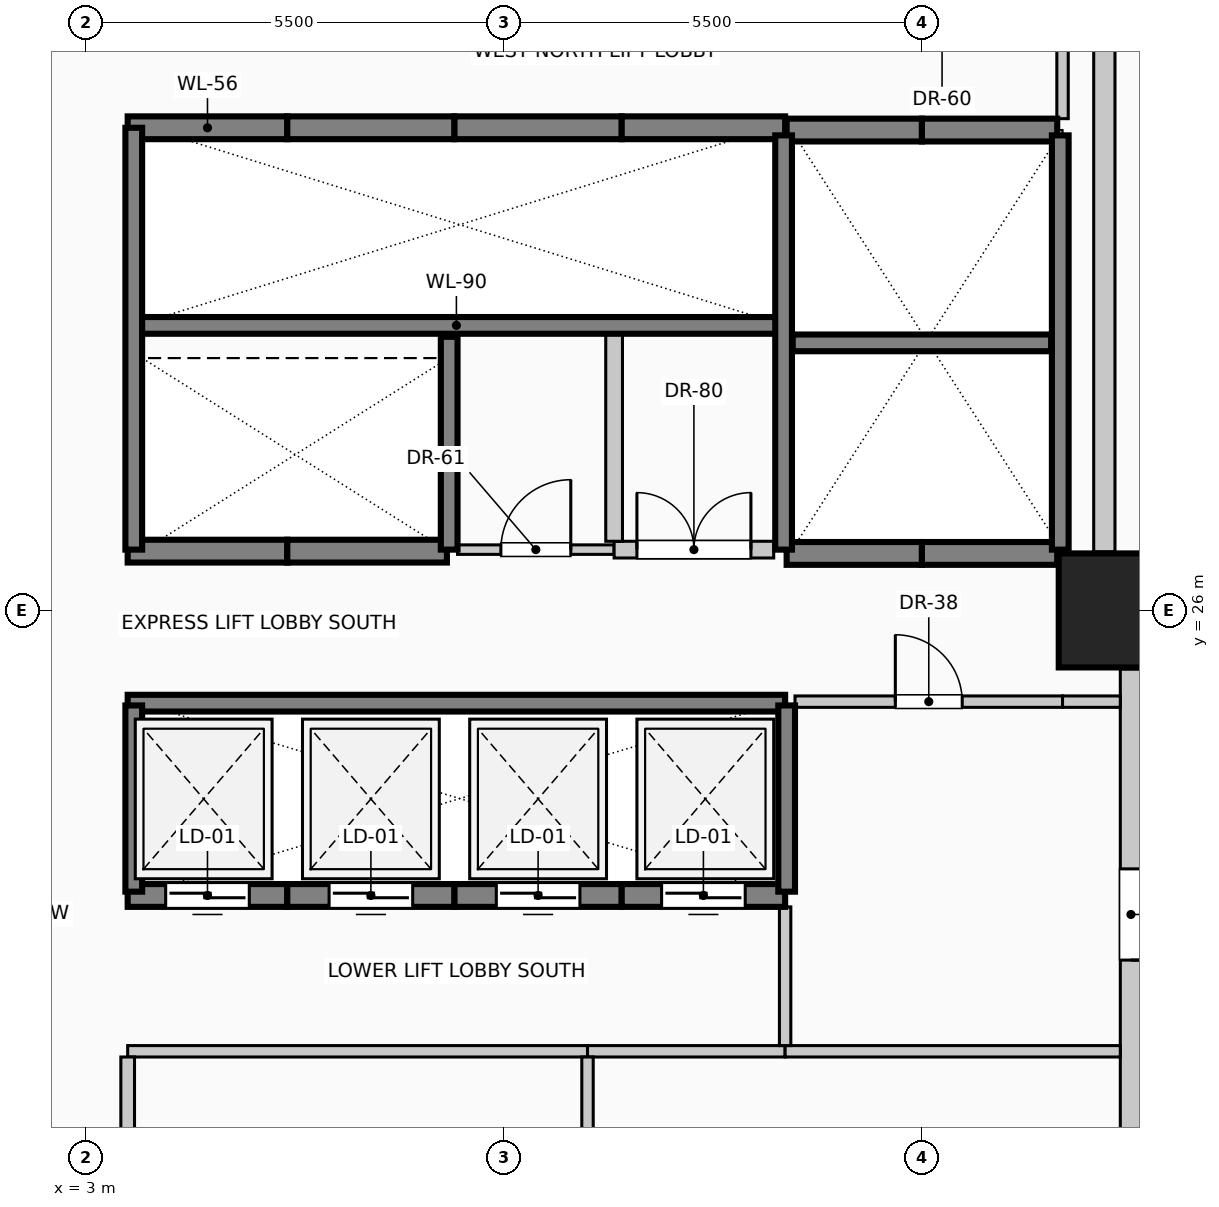
"""IFC4 building model, lengths in metres.
Left out: names, types, materials, properties, quantities, classifications, styles, units other than length and angle.
Written with IfcOpenShell. Run it as: python <this file> out.ifc"""

import sys

from ifc_helpers import new_model, si_unit, direction, frame, frame_2d, origin, origin_2d, place, context, subcontext, project, spatial, rectangle, extrude, element, fill, save


model = new_model("IFC4")
c1 = context("Model", 3, precision=1e-05, world=origin(), true_north=direction((0.0, 1.0)))
c2 = subcontext(c1, "Body", "Model", "MODEL_VIEW")
j1 = project(units=[si_unit("LENGTHUNIT", "METRE"), si_unit("PLANEANGLEUNIT", "RADIAN")], contexts=[c1])
p1 = place(None, origin())
s1 = spatial("IfcSite", under=j1, at=p1, CompositionType="ELEMENT")
p2 = place(p1, origin())
s2 = spatial("IfcBuilding", under=s1, at=p2, CompositionType="ELEMENT")
p3 = place(p2, frame((0.0, 0.0, 38.6)))
s3 = spatial("IfcBuildingStorey", under=s2, at=p3, CompositionType="ELEMENT", Elevation=38.6)
p4 = place(p3, frame((16.4, 26.0, 0.0), z_axis=(0.0, 0.0, 1.0), x_axis=(1.0, 0.0, 0.0)))
e1 = element("IfcColumn", 1, at=p4, inside=s3, PredefinedType="COLUMN", context=c2, shape_type="SweptSolid", body=[
    extrude(rectangle(XDim=1.2, YDim=1.5, at=origin_2d()), origin(), (0.0, 0.0, 1.0), 4.0),
])
p5 = place(p3, frame((16.75, 25.23, 0.0), z_axis=(0.0, 0.0, 1.0), x_axis=(0.0, -1.0, 0.0)))
e2 = element("IfcWall", 2, at=p5, inside=s3, PredefinedType="SOLIDWALL", context=c2, shape_type="SweptSolid", body=[
    extrude(rectangle(XDim=6.46, YDim=0.28, at=frame_2d((3.23, 0.0))), origin(), (0.0, 0.0, 1.0), 3.7),
])
p6 = place(p5, frame((2.63, 0.0, 0.0)))
e3 = element("IfcOpeningElement", 3, at=p6, cuts=e2, PredefinedType="OPENING", context=c2, shape_type="SweptSolid", body=[
    extrude(rectangle(XDim=1.2, YDim=2.25, at=frame_2d((0.6, 1.125))), frame((0.0, 0.15, 0.0), z_axis=(0.0, -1.0, 0.0), x_axis=(1.0, 0.0, 0.0)), (0.0, 0.0, 1.0), 0.3),
])
p7 = place(p3, frame((16.4, 33.48, 0.0), z_axis=(0.0, 0.0, 1.0), x_axis=(0.0, -1.0, 0.0)))
e4 = element("IfcWall", 4, at=p7, inside=s3, PredefinedType="SOLIDWALL", context=c2, shape_type="SweptSolid", body=[
    extrude(rectangle(XDim=6.71, YDim=0.28, at=frame_2d((3.355, 0.0))), origin(), (0.0, 0.0, 1.0), 3.0),
])
p8 = place(p3, frame((5.65, 22.25, 0.0), z_axis=(0.0, 0.0, 1.0), x_axis=(-1.0, 0.0, 0.0)))
e5 = element("IfcWall", 5, at=p8, inside=s3, PredefinedType="SOLIDWALL", context=c2, shape_type="SweptSolid", body=[
    extrude(rectangle(XDim=2.1, YDim=0.3, at=frame_2d((1.05, 0.0))), origin(), (0.0, 0.0, 1.0), 4.0),
])
p9 = place(p8, frame((0.5, 0.0, 0.0)))
e6 = element("IfcOpeningElement", 6, at=p9, cuts=e5, PredefinedType="OPENING", context=c2, shape_type="SweptSolid", body=[
    extrude(rectangle(XDim=1.1, YDim=2.2, at=frame_2d((0.55, 1.1))), frame((0.0, 0.16, 0.0), z_axis=(0.0, -1.0, 0.0), x_axis=(1.0, 0.0, 0.0)), (0.0, 0.0, 1.0), 0.32),
])
p10 = place(p3, frame((7.85, 22.25, 0.0), z_axis=(0.0, 0.0, 1.0), x_axis=(-1.0, 0.0, 0.0)))
e7 = element("IfcWall", 7, at=p10, inside=s3, PredefinedType="SOLIDWALL", context=c2, shape_type="SweptSolid", body=[
    extrude(rectangle(XDim=2.2, YDim=0.3, at=frame_2d((1.1, 0.0))), origin(), (0.0, 0.0, 1.0), 4.0),
])
p11 = place(p10, frame((0.55, 0.0, 0.0)))
e8 = element("IfcOpeningElement", 8, at=p11, cuts=e7, PredefinedType="OPENING", context=c2, shape_type="SweptSolid", body=[
    extrude(rectangle(XDim=1.1, YDim=2.2, at=frame_2d((0.55, 1.1))), frame((0.0, 0.16, 0.0), z_axis=(0.0, -1.0, 0.0), x_axis=(1.0, 0.0, 0.0)), (0.0, 0.0, 1.0), 0.32),
])
p12 = place(p3, frame((10.05, 22.25, 0.0), z_axis=(0.0, 0.0, 1.0), x_axis=(-1.0, 0.0, 0.0)))
e9 = element("IfcWall", 9, at=p12, inside=s3, PredefinedType="SOLIDWALL", context=c2, shape_type="SweptSolid", body=[
    extrude(rectangle(XDim=2.2, YDim=0.3, at=frame_2d((1.1, 0.0))), origin(), (0.0, 0.0, 1.0), 4.0),
])
p13 = place(p12, frame((0.55, 0.0, 0.0)))
e10 = element("IfcOpeningElement", 10, at=p13, cuts=e9, PredefinedType="OPENING", context=c2, shape_type="SweptSolid", body=[
    extrude(rectangle(XDim=1.1, YDim=2.2, at=frame_2d((0.55, 1.1))), frame((0.0, 0.16, 0.0), z_axis=(0.0, -1.0, 0.0), x_axis=(1.0, 0.0, 0.0)), (0.0, 0.0, 1.0), 0.32),
])
p14 = place(p3, frame((12.2, 22.25, 0.0), z_axis=(0.0, 0.0, 1.0), x_axis=(-1.0, 0.0, 0.0)))
e11 = element("IfcWall", 11, at=p14, inside=s3, PredefinedType="SOLIDWALL", context=c2, shape_type="SweptSolid", body=[
    extrude(rectangle(XDim=2.15, YDim=0.3, at=frame_2d((1.075, 0.0))), origin(), (0.0, 0.0, 1.0), 4.0),
])
p15 = place(p14, frame((0.525, 0.0, 0.0)))
e12 = element("IfcOpeningElement", 12, at=p15, cuts=e11, PredefinedType="OPENING", context=c2, shape_type="SweptSolid", body=[
    extrude(rectangle(XDim=1.1, YDim=2.2, at=frame_2d((0.55, 1.1))), frame((0.0, 0.16, 0.0), z_axis=(0.0, -1.0, 0.0), x_axis=(1.0, 0.0, 0.0)), (0.0, 0.0, 1.0), 0.32),
])
for number, where, z_axis, x_axis in (
    (13, (14.0, 26.75, 0.0), (0.0, 0.0, 1.0), (-1.0, 0.0, 0.0)),
    (14, (15.78, 26.75, 0.0), (0.0, 0.0, 1.0), (-1.0, 0.0, 0.0)),
    (15, (12.22, 32.32, 0.0), (0.0, 0.0, 1.0), (1.0, 0.0, 0.0)),
    (16, (14.0, 32.32, 0.0), (0.0, 0.0, 1.0), (1.0, 0.0, 0.0)),
):
    element("IfcWall", number, at=place(p3, frame(where, z_axis=z_axis, x_axis=x_axis)), inside=s3, PredefinedType="SOLIDWALL", context=c2, shape_type="SweptSolid", body=[
        extrude(rectangle(XDim=1.78, YDim=0.3, at=frame_2d((0.89, 0.0))), origin(), (0.0, 0.0, 1.0), 4.0),
    ])
p16 = place(p3, frame((3.55, 32.35, 0.0), z_axis=(0.0, 0.0, 1.0), x_axis=(1.0, 0.0, 0.0)))
e17 = element("IfcWall", 17, at=p16, inside=s3, PredefinedType="SOLIDWALL", context=c2, shape_type="SweptSolid", body=[
    extrude(rectangle(XDim=2.1, YDim=0.3, at=frame_2d((1.05, 0.0))), origin(), (0.0, 0.0, 1.0), 4.0),
])
p17 = place(p3, frame((5.65, 32.35, 0.0), z_axis=(0.0, 0.0, 1.0), x_axis=(1.0, 0.0, 0.0)))
e18 = element("IfcWall", 18, at=p17, inside=s3, PredefinedType="SOLIDWALL", context=c2, shape_type="SweptSolid", body=[
    extrude(rectangle(XDim=2.2, YDim=0.3, at=frame_2d((1.1, 0.0))), origin(), (0.0, 0.0, 1.0), 4.0),
])
p18 = place(p3, frame((7.85, 32.35, 0.0), z_axis=(0.0, 0.0, 1.0), x_axis=(1.0, 0.0, 0.0)))
e19 = element("IfcWall", 19, at=p18, inside=s3, PredefinedType="SOLIDWALL", context=c2, shape_type="SweptSolid", body=[
    extrude(rectangle(XDim=2.2, YDim=0.3, at=frame_2d((1.1, 0.0))), origin(), (0.0, 0.0, 1.0), 4.0),
])
p19 = place(p3, frame((10.05, 32.35, 0.0), z_axis=(0.0, 0.0, 1.0), x_axis=(1.0, 0.0, 0.0)))
e20 = element("IfcWall", 20, at=p19, inside=s3, PredefinedType="SOLIDWALL", context=c2, shape_type="SweptSolid", body=[
    extrude(rectangle(XDim=2.15, YDim=0.3, at=frame_2d((1.075, 0.0))), origin(), (0.0, 0.0, 1.0), 4.0),
])
p20 = place(p3, frame((5.65, 26.78, 0.0), z_axis=(0.0, 0.0, 1.0), x_axis=(-1.0, 0.0, 0.0)))
e21 = element("IfcWall", 21, at=p20, inside=s3, PredefinedType="SOLIDWALL", context=c2, shape_type="SweptSolid", body=[
    extrude(rectangle(XDim=2.1, YDim=0.3, at=frame_2d((1.05, 0.0))), origin(), (0.0, 0.0, 1.0), 4.0),
])
p21 = place(p3, frame((7.75, 26.78, 0.0), z_axis=(0.0, 0.0, 1.0), x_axis=(-1.0, 0.0, 0.0)))
e22 = element("IfcWall", 22, at=p21, inside=s3, PredefinedType="SOLIDWALL", context=c2, shape_type="SweptSolid", body=[
    extrude(rectangle(XDim=2.1, YDim=0.3, at=frame_2d((1.05, 0.0))), origin(), (0.0, 0.0, 1.0), 4.0),
])
p22 = place(p3, frame((3.55, 29.75, 0.0), z_axis=(0.0, 0.0, 1.0), x_axis=(1.0, 0.0, 0.0)))
e23 = element("IfcWall", 23, at=p22, inside=s3, PredefinedType="SOLIDWALL", context=c2, shape_type="SweptSolid", body=[
    extrude(rectangle(XDim=8.65, YDim=0.22, at=frame_2d((4.325, 0.0))), origin(), (0.0, 0.0, 1.0), 4.0),
])
p23 = place(p3, frame((3.63, 26.8, 0.0), z_axis=(0.0, 0.0, 1.0), x_axis=(0.0, 1.0, 0.0)))
e24 = element("IfcWall", 24, at=p23, inside=s3, PredefinedType="SOLIDWALL", context=c2, shape_type="SweptSolid", body=[
    extrude(rectangle(XDim=5.55, YDim=0.22, at=frame_2d((2.775, 0.0))), origin(), (0.0, 0.0, 1.0), 4.0),
])
p24 = place(p3, frame((7.78, 26.8, 0.0), z_axis=(0.0, 0.0, 1.0), x_axis=(0.0, 1.0, 0.0)))
e25 = element("IfcWall", 25, at=p24, inside=s3, PredefinedType="SOLIDWALL", context=c2, shape_type="SweptSolid", body=[
    extrude(rectangle(XDim=2.8, YDim=0.22, at=frame_2d((1.4, 0.0))), origin(), (0.0, 0.0, 1.0), 4.0),
])
for number, where, z_axis, x_axis in (
    (26, (12.18, 26.8, 0.0), (0.0, 0.0, 1.0), (0.0, 1.0, 0.0)),
    (27, (15.82, 26.8, 0.0), (0.0, 0.0, 1.0), (0.0, 1.0, 0.0)),
):
    element("IfcWall", number, at=place(p3, frame(where, z_axis=z_axis, x_axis=x_axis)), inside=s3, PredefinedType="SOLIDWALL", context=c2, shape_type="SweptSolid", body=[
        extrude(rectangle(XDim=5.45, YDim=0.22, at=frame_2d((2.725, 0.0))), origin(), (0.0, 0.0, 1.0), 4.0),
    ])
p25 = place(p3, frame((12.3, 29.52, 0.0), z_axis=(0.0, 0.0, 1.0), x_axis=(1.0, 0.0, 0.0)))
e28 = element("IfcWall", 28, at=p25, inside=s3, PredefinedType="SOLIDWALL", context=c2, shape_type="SweptSolid", body=[
    extrude(rectangle(XDim=3.4, YDim=0.22, at=frame_2d((1.7, 0.0))), origin(), (0.0, 0.0, 1.0), 4.0),
])
p26 = place(p3, frame((3.55, 24.78, 0.0), z_axis=(0.0, 0.0, 1.0), x_axis=(1.0, 0.0, 0.0)))
e29 = element("IfcWall", 29, at=p26, inside=s3, PredefinedType="SOLIDWALL", context=c2, shape_type="SweptSolid", body=[
    extrude(rectangle(XDim=8.65, YDim=0.22, at=frame_2d((4.325, 0.0))), origin(), (0.0, 0.0, 1.0), 4.0),
])
for number, where, z_axis, x_axis in (
    (30, (3.63, 22.3, 0.0), (0.0, 0.0, 1.0), (0.0, 1.0, 0.0)),
    (31, (12.22, 22.3, 0.0), (0.0, 0.0, 1.0), (0.0, 1.0, 0.0)),
):
    element("IfcWall", number, at=place(p3, frame(where, z_axis=z_axis, x_axis=x_axis)), inside=s3, PredefinedType="SOLIDWALL", context=c2, shape_type="SweptSolid", body=[
        extrude(rectangle(XDim=2.45, YDim=0.22, at=frame_2d((1.225, 0.0))), origin(), (0.0, 0.0, 1.0), 4.0),
    ])
p27 = place(p3, frame((3.55, 20.2, 0.0), z_axis=(0.0, 0.0, 1.0), x_axis=(1.0, 0.0, 0.0)))
e32 = element("IfcWall", 32, at=p27, inside=s3, PredefinedType="PARTITIONING", context=c2, shape_type="SweptSolid", body=[
    extrude(rectangle(XDim=6.05, YDim=0.15, at=frame_2d((3.025, 0.0))), origin(), (0.0, 0.0, 1.0), 3.7),
])
p28 = place(p3, frame((9.6, 20.2, 0.0), z_axis=(0.0, 0.0, 1.0), x_axis=(1.0, 0.0, 0.0)))
e33 = element("IfcWall", 33, at=p28, inside=s3, PredefinedType="PARTITIONING", context=c2, shape_type="SweptSolid", body=[
    extrude(rectangle(XDim=2.6, YDim=0.15, at=frame_2d((1.3, 0.0))), origin(), (0.0, 0.0, 1.0), 3.7),
])
p29 = place(p3, frame((12.2, 20.2, 0.0), z_axis=(0.0, 0.0, 1.0), x_axis=(1.0, 0.0, 0.0)))
e34 = element("IfcWall", 34, at=p29, inside=s3, PredefinedType="PARTITIONING", context=c2, shape_type="SweptSolid", body=[
    extrude(rectangle(XDim=4.41, YDim=0.15, at=frame_2d((2.205, 0.0))), origin(), (0.0, 0.0, 1.0), 3.7),
])
p30 = place(p3, frame((12.33, 24.8, 0.0), z_axis=(0.0, 0.0, 1.0), x_axis=(1.0, 0.0, 0.0)))
e35 = element("IfcWall", 35, at=p30, inside=s3, PredefinedType="PARTITIONING", context=c2, shape_type="SweptSolid", body=[
    extrude(rectangle(XDim=3.52, YDim=0.15, at=frame_2d((1.76, 0.0))), origin(), (0.0, 0.0, 1.0), 3.7),
])
p31 = place(p30, frame((1.32, 0.0, 0.0)))
e36 = element("IfcOpeningElement", 36, at=p31, cuts=e35, PredefinedType="OPENING", context=c2, shape_type="SweptSolid", body=[
    extrude(rectangle(XDim=0.88, YDim=2.1, at=frame_2d((0.44, 1.05))), frame((0.0, 0.085, 0.0), z_axis=(0.0, -1.0, 0.0), x_axis=(1.0, 0.0, 0.0)), (0.0, 0.0, 1.0), 0.17),
])
p32 = place(p3, frame((15.85, 24.8, 0.0), z_axis=(0.0, 0.0, 1.0), x_axis=(1.0, 0.0, 0.0)))
e37 = element("IfcWall", 37, at=p32, inside=s3, PredefinedType="PARTITIONING", context=c2, shape_type="SweptSolid", body=[
    extrude(rectangle(XDim=0.76, YDim=0.15, at=frame_2d((0.38, 0.0))), origin(), (0.0, 0.0, 1.0), 3.7),
])
p33 = place(p3, frame((7.89, 26.8, 0.0), z_axis=(0.0, 0.0, 1.0), x_axis=(1.0, 0.0, 0.0)))
e38 = element("IfcWall", 38, at=p33, inside=s3, PredefinedType="PARTITIONING", context=c2, shape_type="SweptSolid", body=[
    extrude(rectangle(XDim=2.06, YDim=0.125, at=frame_2d((1.03, 0.0))), origin(), (0.0, 0.0, 1.0), 3.7),
])
p34 = place(p33, frame((0.57, 0.0, 0.0)))
e39 = element("IfcOpeningElement", 39, at=p34, cuts=e38, PredefinedType="OPENING", context=c2, shape_type="SweptSolid", body=[
    extrude(rectangle(XDim=0.92, YDim=2.1, at=frame_2d((0.46, 1.05))), frame((0.0, 0.073, 0.0), z_axis=(0.0, -1.0, 0.0), x_axis=(1.0, 0.0, 0.0)), (0.0, 0.0, 1.0), 0.145),
])
p35 = place(p3, frame((9.95, 26.8, 0.0), z_axis=(0.0, 0.0, 1.0), x_axis=(1.0, 0.0, 0.0)))
e40 = element("IfcWall", 40, at=p35, inside=s3, PredefinedType="PARTITIONING", context=c2, shape_type="SweptSolid", body=[
    extrude(rectangle(XDim=2.1, YDim=0.22, at=frame_2d((1.05, 0.0))), origin(), (0.0, 0.0, 1.0), 3.7),
])
p36 = place(p35, frame((0.3, 0.0, 0.0)))
e41 = element("IfcOpeningElement", 41, at=p36, cuts=e40, PredefinedType="OPENING", context=c2, shape_type="SweptSolid", body=[
    extrude(rectangle(XDim=1.5, YDim=2.25, at=frame_2d((0.75, 1.125))), frame((0.0, 0.12, 0.0), z_axis=(0.0, -1.0, 0.0), x_axis=(1.0, 0.0, 0.0)), (0.0, 0.0, 1.0), 0.24),
])
p37 = place(p3, frame((3.55, 13.69, 0.0), z_axis=(0.0, 0.0, 1.0), x_axis=(0.0, 1.0, 0.0)))
e42 = element("IfcWall", 42, at=p37, inside=s3, PredefinedType="PARTITIONING", context=c2, shape_type="SweptSolid", body=[
    extrude(rectangle(XDim=6.435, YDim=0.18, at=frame_2d((3.218, 0.0))), origin(), (0.0, 0.0, 1.0), 3.7),
])
p38 = place(p3, frame((9.6, 13.69, 0.0), z_axis=(0.0, 0.0, 1.0), x_axis=(0.0, 1.0, 0.0)))
e43 = element("IfcWall", 43, at=p38, inside=s3, PredefinedType="PARTITIONING", context=c2, shape_type="SweptSolid", body=[
    extrude(rectangle(XDim=6.435, YDim=0.15, at=frame_2d((3.218, 0.0))), origin(), (0.0, 0.0, 1.0), 3.7),
])
p39 = place(p3, frame((9.95, 26.91, 0.0), z_axis=(0.0, 0.0, 1.0), x_axis=(0.0, 1.0, 0.0)))
e44 = element("IfcWall", 44, at=p39, inside=s3, PredefinedType="PARTITIONING", context=c2, shape_type="SweptSolid", body=[
    extrude(rectangle(XDim=2.73, YDim=0.22, at=frame_2d((1.365, 0.0))), origin(), (0.0, 0.0, 1.0), 3.7),
])
p40 = place(p3, frame((12.2, 20.275, 0.0), z_axis=(0.0, 0.0, 1.0), x_axis=(0.0, 1.0, 0.0)))
e45 = element("IfcWall", 45, at=p40, inside=s3, PredefinedType="PARTITIONING", context=c2, shape_type="SweptSolid", body=[
    extrude(rectangle(XDim=1.825, YDim=0.15, at=frame_2d((0.913, 0.0))), origin(), (0.0, 0.0, 1.0), 3.7),
])
p41 = place(p3, frame((15.85, 32.47, 0.0), z_axis=(0.0, 0.0, 1.0), x_axis=(0.0, 1.0, 0.0)))
e46 = element("IfcWall", 46, at=p41, inside=s3, PredefinedType="PARTITIONING", context=c2, shape_type="SweptSolid", body=[
    extrude(rectangle(XDim=1.03, YDim=0.15, at=frame_2d((0.515, 0.0))), origin(), (0.0, 0.0, 1.0), 3.7),
])
p42 = place(p6, origin())
e47 = element("IfcDoor", 47, at=p42, inside=s3, OperationType="SINGLE_SWING_RIGHT", PredefinedType="DOOR", context=c2, shape_type="SweptSolid", body=[
    extrude(rectangle(XDim=1.2, YDim=2.25, at=frame_2d((0.6, 1.125))), frame((0.0, 0.025, 0.0), z_axis=(0.0, -1.0, 0.0), x_axis=(1.0, 0.0, 0.0)), (0.0, 0.0, 1.0), 0.05),
])
fill(e3, e47)
p43 = place(p9, origin())
e48 = element("IfcDoor", 48, at=p43, inside=s3, OperationType="SLIDING_TO_LEFT", PredefinedType="DOOR", context=c2, shape_type="SweptSolid", body=[
    extrude(rectangle(XDim=1.1, YDim=2.2, at=frame_2d((0.55, 1.1))), frame((0.0, 0.025, 0.0), z_axis=(0.0, -1.0, 0.0), x_axis=(1.0, 0.0, 0.0)), (0.0, 0.0, 1.0), 0.05),
])
fill(e6, e48)
p44 = place(p11, origin())
e49 = element("IfcDoor", 49, at=p44, inside=s3, OperationType="SLIDING_TO_RIGHT", PredefinedType="DOOR", context=c2, shape_type="SweptSolid", body=[
    extrude(rectangle(XDim=1.1, YDim=2.2, at=frame_2d((0.55, 1.1))), frame((0.0, 0.025, 0.0), z_axis=(0.0, -1.0, 0.0), x_axis=(1.0, 0.0, 0.0)), (0.0, 0.0, 1.0), 0.05),
])
fill(e8, e49)
p45 = place(p13, origin())
e50 = element("IfcDoor", 50, at=p45, inside=s3, OperationType="SLIDING_TO_LEFT", PredefinedType="DOOR", context=c2, shape_type="SweptSolid", body=[
    extrude(rectangle(XDim=1.1, YDim=2.2, at=frame_2d((0.55, 1.1))), frame((0.0, 0.025, 0.0), z_axis=(0.0, -1.0, 0.0), x_axis=(1.0, 0.0, 0.0)), (0.0, 0.0, 1.0), 0.05),
])
fill(e10, e50)
p46 = place(p15, origin())
e51 = element("IfcDoor", 51, at=p46, inside=s3, OperationType="SLIDING_TO_RIGHT", PredefinedType="DOOR", context=c2, shape_type="SweptSolid", body=[
    extrude(rectangle(XDim=1.1, YDim=2.2, at=frame_2d((0.55, 1.1))), frame((0.0, 0.025, 0.0), z_axis=(0.0, -1.0, 0.0), x_axis=(1.0, 0.0, 0.0)), (0.0, 0.0, 1.0), 0.05),
])
fill(e12, e51)
p47 = place(p31, origin())
e52 = element("IfcDoor", 52, at=p47, inside=s3, OperationType="SINGLE_SWING_LEFT", PredefinedType="DOOR", context=c2, shape_type="SweptSolid", body=[
    extrude(rectangle(XDim=0.88, YDim=2.1, at=frame_2d((0.44, 1.05))), frame((0.0, 0.025, 0.0), z_axis=(0.0, -1.0, 0.0), x_axis=(1.0, 0.0, 0.0)), (0.0, 0.0, 1.0), 0.05),
])
fill(e36, e52)
p48 = place(p34, origin())
e53 = element("IfcDoor", 53, at=p48, inside=s3, OperationType="SINGLE_SWING_RIGHT", PredefinedType="DOOR", context=c2, shape_type="SweptSolid", body=[
    extrude(rectangle(XDim=0.92, YDim=2.1, at=frame_2d((0.46, 1.05))), frame((0.0, 0.025, 0.0), z_axis=(0.0, -1.0, 0.0), x_axis=(1.0, 0.0, 0.0)), (0.0, 0.0, 1.0), 0.05),
])
fill(e39, e53)
p49 = place(p36, origin())
e54 = element("IfcDoor", 54, at=p49, inside=s3, OperationType="DOUBLE_DOOR_SINGLE_SWING", PredefinedType="DOOR", context=c2, shape_type="SweptSolid", body=[
    extrude(rectangle(XDim=1.5, YDim=2.25, at=frame_2d((0.75, 1.125))), frame((0.0, 0.025, 0.0), z_axis=(0.0, -1.0, 0.0), x_axis=(1.0, 0.0, 0.0)), (0.0, 0.0, 1.0), 0.05),
])
fill(e41, e54)
save(model, sys.argv[1])
